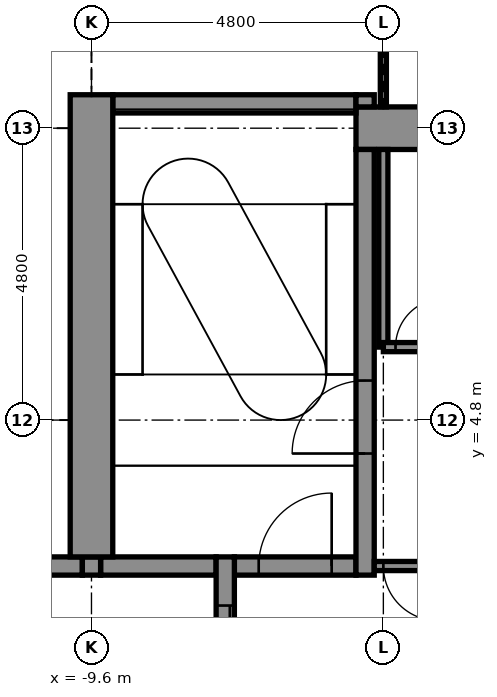
"""IFC4 building model, lengths in metres.
Left out: names, types, materials, properties, quantities, classifications, styles, units other than length and angle.
Written with IfcOpenShell. Run it as: python <this file> out.ifc"""

import sys

from ifc_helpers import new_model, si_unit, direction, frame, frame_2d, origin, place, context, subcontext, project, spatial, rectangle, extrude, element, fill, save


model = new_model("IFC4")
c1 = context("Model", 3, precision=1e-05, world=origin(), true_north=direction((0.0, 1.0)))
c2 = subcontext(c1, "Body", "Model", "MODEL_VIEW")
j1 = project(units=[si_unit("LENGTHUNIT", "METRE"), si_unit("PLANEANGLEUNIT", "RADIAN")], contexts=[c1])
p1 = place(None, origin())
s1 = spatial("IfcSite", under=j1, at=p1, CompositionType="ELEMENT")
p2 = place(p1, origin())
s2 = spatial("IfcBuilding", under=s1, at=p2, CompositionType="ELEMENT")
p3 = place(p2, frame((0.0, 0.0, 181.7)))
s3 = spatial("IfcBuildingStorey", under=s2, at=p3, CompositionType="ELEMENT", Elevation=181.7)
p4 = place(p3, frame((-10.85, 2.4, -0.15), z_axis=(0.0, 0.0, 1.0), x_axis=(1.0, 0.0, 0.0)))
e1 = element("IfcWall", 1, at=p4, inside=s3, PredefinedType="STANDARD", context=c2, shape_type="SweptSolid", body=[
    extrude(rectangle(XDim=1.1, YDim=0.3, at=frame_2d((0.55, 0.0))), origin(), (0.0, 0.0, 1.0), 3.9),
])
p5 = place(p3, frame((-9.45, 2.4, -0.15), z_axis=(0.0, 0.0, 1.0), x_axis=(1.0, 0.0, 0.0)))
e2 = element("IfcWall", 2, at=p5, inside=s3, PredefinedType="STANDARD", context=c2, shape_type="SweptSolid", body=[
    extrude(rectangle(XDim=1.9, YDim=0.3, at=frame_2d((0.95, 0.0))), origin(), (0.0, 0.0, 1.0), 3.9),
])
p6 = place(p3, frame((-7.25, 2.4, -0.15), z_axis=(0.0, 0.0, 1.0), x_axis=(1.0, 0.0, 0.0)))
e3 = element("IfcWall", 3, at=p6, inside=s3, PredefinedType="STANDARD", context=c2, shape_type="SweptSolid", body=[
    extrude(rectangle(XDim=2.0, YDim=0.3, at=frame_2d((1.0, 0.0))), origin(), (0.0, 0.0, 1.0), 3.9),
])
p7 = place(p6, frame((0.4, 0.0, 0.15)))
e4 = element("IfcOpeningElement", 4, at=p7, cuts=e3, PredefinedType="OPENING", context=c2, shape_type="SweptSolid", body=[
    extrude(rectangle(XDim=1.2, YDim=2.1, at=frame_2d((0.6, 1.05))), frame((0.0, 0.16, 0.0), z_axis=(0.0, -1.0, 0.0), x_axis=(1.0, 0.0, 0.0)), (0.0, 0.0, 1.0), 0.32),
])
p8 = place(p3, frame((-5.25, 9.6, -0.15), z_axis=(0.0, 0.0, 1.0), x_axis=(1.0, 0.0, 0.0)))
e5 = element("IfcWall", 5, at=p8, inside=s3, PredefinedType="SHEAR", context=c2, shape_type="SweptSolid", body=[
    extrude(rectangle(XDim=14.5, YDim=0.7, at=frame_2d((7.25, 0.0))), origin(), (0.0, 0.0, 1.0), 3.9),
])
p9 = place(p8, frame((9.35, 0.0, 0.15)))
e6 = element("IfcOpeningElement", 6, at=p9, cuts=e5, PredefinedType="OPENING", context=c2, shape_type="SweptSolid", body=[
    extrude(rectangle(XDim=1.4, YDim=2.1, at=frame_2d((0.7, 1.05))), frame((0.0, 0.36, 0.0), z_axis=(0.0, -1.0, 0.0), x_axis=(1.0, 0.0, 0.0)), (0.0, 0.0, 1.0), 0.72),
])
p10 = place(p3, frame((-9.25, 10.0, -0.15), z_axis=(0.0, 0.0, 1.0), x_axis=(1.0, 0.0, 0.0)))
e7 = element("IfcWall", 7, at=p10, inside=s3, PredefinedType="STANDARD", context=c2, shape_type="SweptSolid", body=[
    extrude(rectangle(XDim=4.0, YDim=0.3, at=frame_2d((2.0, 0.0))), origin(), (0.0, 0.0, 1.0), 3.9),
])
p11 = place(p3, frame((-9.6, 2.25, -0.15), z_axis=(0.0, 0.0, 1.0), x_axis=(0.0, 1.0, 0.0)))
e8 = element("IfcWall", 8, at=p11, inside=s3, PredefinedType="STANDARD", context=c2, shape_type="SweptSolid", body=[
    extrude(rectangle(XDim=0.3, YDim=0.3, at=frame_2d((0.15, 0.0))), origin(), (0.0, 0.0, 1.0), 3.9),
])
p12 = place(p3, frame((-9.6, 2.55, -0.15), z_axis=(0.0, 0.0, 1.0), x_axis=(0.0, 1.0, 0.0)))
e9 = element("IfcWall", 9, at=p12, inside=s3, PredefinedType="SHEAR", context=c2, shape_type="SweptSolid", body=[
    extrude(rectangle(XDim=7.6, YDim=0.7, at=frame_2d((3.8, 0.0))), origin(), (0.0, 0.0, 1.0), 3.9),
])
p13 = place(p3, frame((-7.4, -2.55, -0.15), z_axis=(0.0, 0.0, 1.0), x_axis=(0.0, 1.0, 0.0)))
e10 = element("IfcWall", 10, at=p13, inside=s3, PredefinedType="STANDARD", context=c2, shape_type="SweptSolid", body=[
    extrude(rectangle(XDim=5.1, YDim=0.3, at=frame_2d((2.55, 0.0))), origin(), (0.0, 0.0, 1.0), 3.9),
])
p14 = place(p13, frame((0.8, 0.0, 0.15)))
e11 = element("IfcOpeningElement", 11, at=p14, cuts=e10, PredefinedType="OPENING", context=c2, shape_type="SweptSolid", body=[
    extrude(rectangle(XDim=1.1, YDim=2.1, at=frame_2d((0.55, 1.05))), frame((0.0, 0.16, 0.0), z_axis=(0.0, -1.0, 0.0), x_axis=(1.0, 0.0, 0.0)), (0.0, 0.0, 1.0), 0.32),
])
p15 = place(p13, frame((3.2, 0.0, 0.15)))
e12 = element("IfcOpeningElement", 12, at=p15, cuts=e10, PredefinedType="OPENING", context=c2, shape_type="SweptSolid", body=[
    extrude(rectangle(XDim=1.1, YDim=2.1, at=frame_2d((0.55, 1.05))), frame((0.0, 0.16, 0.0), z_axis=(0.0, -1.0, 0.0), x_axis=(1.0, 0.0, 0.0)), (0.0, 0.0, 1.0), 0.32),
])
p16 = place(p3, frame((-5.1, 2.25, -0.15), z_axis=(0.0, 0.0, 1.0), x_axis=(0.0, 1.0, 0.0)))
e13 = element("IfcWall", 13, at=p16, inside=s3, PredefinedType="STANDARD", context=c2, shape_type="SweptSolid", body=[
    extrude(rectangle(XDim=7.0, YDim=0.3, at=frame_2d((3.5, 0.0))), origin(), (0.0, 0.0, 1.0), 3.9),
])
p17 = place(p16, frame((2.0, 0.0, 0.15)))
e14 = element("IfcOpeningElement", 14, at=p17, cuts=e13, PredefinedType="OPENING", context=c2, shape_type="SweptSolid", body=[
    extrude(rectangle(XDim=1.2, YDim=2.1, at=frame_2d((0.6, 1.05))), frame((0.0, 0.16, 0.0), z_axis=(0.0, -1.0, 0.0), x_axis=(1.0, 0.0, 0.0)), (0.0, 0.0, 1.0), 0.32),
])
p18 = place(p3, frame((-5.1, 9.95, -0.15), z_axis=(0.0, 0.0, 1.0), x_axis=(0.0, 1.0, 0.0)))
e15 = element("IfcWall", 15, at=p18, inside=s3, PredefinedType="STANDARD", context=c2, shape_type="SweptSolid", body=[
    extrude(rectangle(XDim=0.2, YDim=0.3, at=frame_2d((0.1, 0.0))), origin(), (0.0, 0.0, 1.0), 3.9),
])
p19 = place(p3, frame((-4.8, 9.95, 0.0), z_axis=(0.0, 0.0, 1.0), x_axis=(0.0, 1.0, 0.0)))
e16 = element("IfcWall", 16, at=p19, inside=s3, PredefinedType="PARTITIONING", context=c2, shape_type="SweptSolid", body=[
    extrude(rectangle(XDim=4.092, YDim=0.1, at=frame_2d((2.046, 0.0))), origin(), (0.0, 0.0, 1.0), 3.066),
])
p20 = place(p3, frame((-4.8, 6.0, 0.0), z_axis=(0.0, 0.0, 1.0), x_axis=(0.0, 1.0, 0.0)))
e17 = element("IfcWall", 17, at=p20, inside=s3, PredefinedType="PARTITIONING", context=c2, shape_type="SweptSolid", body=[
    extrude(rectangle(XDim=3.25, YDim=0.15, at=frame_2d((1.625, 0.0))), origin(), (0.0, 0.0, 1.0), 3.75),
])
p21 = place(p3, frame((-4.8, 6.0, 0.0), z_axis=(0.0, 0.0, 1.0), x_axis=(1.0, 0.0, 0.0)))
e18 = element("IfcWall", 18, at=p21, inside=s3, PredefinedType="PARTITIONING", context=c2, shape_type="SweptSolid", body=[
    extrude(rectangle(XDim=1.05, YDim=0.15, at=frame_2d((0.525, 0.0))), origin(), (0.0, 0.0, 1.0), 3.75),
])
p22 = place(p21, frame((0.2, 0.0, 0.0)))
e19 = element("IfcOpeningElement", 19, at=p22, cuts=e18, PredefinedType="OPENING", context=c2, shape_type="SweptSolid", body=[
    extrude(rectangle(XDim=0.8, YDim=2.1, at=frame_2d((0.4, 1.05))), frame((0.0, 0.085, 0.0), z_axis=(0.0, -1.0, 0.0), x_axis=(1.0, 0.0, 0.0)), (0.0, 0.0, 1.0), 0.17),
])
p23 = place(p3, frame((-4.95, 2.4, 0.0), z_axis=(0.0, 0.0, 1.0), x_axis=(1.0, 0.0, 0.0)))
e20 = element("IfcWall", 20, at=p23, inside=s3, PredefinedType="PARTITIONING", context=c2, shape_type="SweptSolid", body=[
    extrude(rectangle(XDim=1.2, YDim=0.15, at=frame_2d((0.6, 0.0))), origin(), (0.0, 0.0, 1.0), 3.75),
])
p24 = place(p23, frame((0.15, 0.0, 0.0)))
e21 = element("IfcOpeningElement", 21, at=p24, cuts=e20, PredefinedType="OPENING", context=c2, shape_type="SweptSolid", body=[
    extrude(rectangle(XDim=0.9, YDim=2.1, at=frame_2d((0.45, 1.05))), frame((0.0, 0.085, 0.0), z_axis=(0.0, -1.0, 0.0), x_axis=(1.0, 0.0, 0.0)), (0.0, 0.0, 1.0), 0.17),
])
p25 = place(p22, origin())
e22 = element("IfcDoor", 22, at=p25, inside=s3, OperationType="SINGLE_SWING_RIGHT", PredefinedType="DOOR", context=c2, shape_type="SweptSolid", body=[
    extrude(rectangle(XDim=0.8, YDim=2.1, at=frame_2d((0.4, 1.05))), frame((0.0, 0.025, 0.0), z_axis=(0.0, -1.0, 0.0), x_axis=(1.0, 0.0, 0.0)), (0.0, 0.0, 1.0), 0.05),
])
fill(e19, e22)
p26 = place(p15, origin())
e23 = element("IfcDoor", 23, at=p26, inside=s3, OperationType="DOUBLE_DOOR_SLIDING", PredefinedType="DOOR", context=c2, shape_type="SweptSolid", body=[
    extrude(rectangle(XDim=1.1, YDim=2.1, at=frame_2d((0.55, 1.05))), frame((0.0, 0.025, 0.0), z_axis=(0.0, -1.0, 0.0), x_axis=(1.0, 0.0, 0.0)), (0.0, 0.0, 1.0), 0.05),
])
fill(e12, e23)
p27 = place(p17, origin())
e24 = element("IfcDoor", 24, at=p27, inside=s3, OperationType="SINGLE_SWING_LEFT", PredefinedType="DOOR", context=c2, shape_type="SweptSolid", body=[
    extrude(rectangle(XDim=1.2, YDim=2.1, at=frame_2d((0.6, 1.05))), frame((0.0, 0.025, 0.0), z_axis=(0.0, -1.0, 0.0), x_axis=(1.0, 0.0, 0.0)), (0.0, 0.0, 1.0), 0.05),
])
fill(e14, e24)
p28 = place(p24, frame((0.9, 0.0, 0.0), z_axis=(0.0, 0.0, 1.0), x_axis=(-1.0, 0.0, 0.0)))
e25 = element("IfcDoor", 25, at=p28, inside=s3, OperationType="SINGLE_SWING_RIGHT", PredefinedType="DOOR", context=c2, shape_type="SweptSolid", body=[
    extrude(rectangle(XDim=0.9, YDim=2.1, at=frame_2d((0.45, 1.05))), frame((0.0, 0.025, 0.0), z_axis=(0.0, -1.0, 0.0), x_axis=(1.0, 0.0, 0.0)), (0.0, 0.0, 1.0), 0.05),
])
fill(e21, e25)
p29 = place(p7, origin())
e26 = element("IfcDoor", 26, at=p29, inside=s3, OperationType="SINGLE_SWING_RIGHT", PredefinedType="DOOR", context=c2, shape_type="SweptSolid", body=[
    extrude(rectangle(XDim=1.2, YDim=2.1, at=frame_2d((0.6, 1.05))), frame((0.0, 0.025, 0.0), z_axis=(0.0, -1.0, 0.0), x_axis=(1.0, 0.0, 0.0)), (0.0, 0.0, 1.0), 0.05),
])
fill(e4, e26)
save(model, sys.argv[1])
